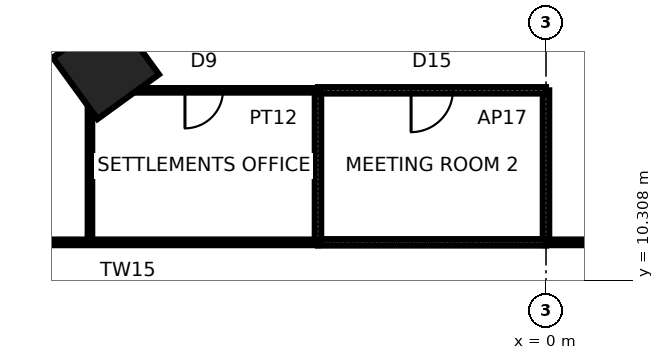
"""IFC4 building model, lengths in metres.
Left out: names, types, materials, properties, quantities, classifications, styles, units other than length and angle.
Written with IfcOpenShell. Run it as: python <this file> out.ifc"""

import sys

from ifc_helpers import new_model, si_unit, direction, frame, frame_2d, origin, origin_2d, place, context, subcontext, project, spatial, rectangle, extrude, element, fill, save


model = new_model("IFC4")
c1 = context("Model", 3, precision=1e-05, world=origin(), true_north=direction((0.0, 1.0)))
c2 = subcontext(c1, "Body", "Model", "MODEL_VIEW")
j1 = project(units=[si_unit("LENGTHUNIT", "METRE"), si_unit("PLANEANGLEUNIT", "RADIAN")], contexts=[c1])
p1 = place(None, origin())
s1 = spatial("IfcSite", under=j1, at=p1, CompositionType="ELEMENT")
p2 = place(p1, origin())
s2 = spatial("IfcBuilding", under=s1, at=p2, CompositionType="ELEMENT")
p3 = place(p2, frame((0.0, 0.0, 78.4)))
s3 = spatial("IfcBuildingStorey", under=s2, at=p3, CompositionType="ELEMENT", Elevation=78.4)
p4 = place(p3, frame((-11.581, 15.94, 0.0), z_axis=(0.0, 0.0, 1.0), x_axis=(-0.587785252292, 0.809016994375, 0.0)))
e1 = element("IfcColumn", 1, at=p4, inside=s3, PredefinedType="COLUMN", context=c2, shape_type="SweptSolid", body=[
    extrude(rectangle(XDim=2.0, YDim=2.0, at=origin_2d()), origin(), (0.0, 0.0, 1.0), 4.2),
])
p5 = place(p3, frame((9.0, 11.3, 0.0), z_axis=(0.0, 0.0, 1.0), x_axis=(-1.0, 0.0, 0.0)))
e2 = element("IfcWall", 2, at=p5, inside=s3, PredefinedType="PARTITIONING", context=c2, shape_type="SweptSolid", body=[
    extrude(rectangle(XDim=9.0, YDim=0.15, at=frame_2d((4.5, 0.0))), origin(), (0.0, 0.0, 1.0), 4.04),
])
p6 = place(p3, frame((0.0, 11.3, 0.0), z_axis=(0.0, 0.0, 1.0), x_axis=(0.0, 1.0, 0.0)))
e3 = element("IfcWall", 3, at=p6, inside=s3, PredefinedType="PARTITIONING", context=c2, shape_type="SweptSolid", body=[
    extrude(rectangle(XDim=4.0, YDim=0.17, at=frame_2d((2.0, 0.0))), origin(), (0.0, 0.0, 1.0), 2.84),
])
p7 = place(p3, frame((0.0, 15.3, 0.0), z_axis=(0.0, 0.0, 1.0), x_axis=(-1.0, 0.0, 0.0)))
e4 = element("IfcWall", 4, at=p7, inside=s3, PredefinedType="PARTITIONING", context=c2, shape_type="SweptSolid", body=[
    extrude(rectangle(XDim=6.0, YDim=0.17, at=frame_2d((3.0, 0.0))), origin(), (0.0, 0.0, 1.0), 3.586),
])
p8 = place(p7, frame((2.45, 0.0, 0.0)))
e5 = element("IfcOpeningElement", 5, at=p8, cuts=e4, PredefinedType="OPENING", context=c2, shape_type="SweptSolid", body=[
    extrude(rectangle(XDim=1.1, YDim=2.4, at=frame_2d((0.55, 1.2))), frame((0.0, 0.095, 0.0), z_axis=(0.0, -1.0, 0.0), x_axis=(1.0, 0.0, 0.0)), (0.0, 0.0, 1.0), 0.19),
])
p9 = place(p3, frame((-6.0, 11.3, 0.0), z_axis=(0.0, 0.0, 1.0), x_axis=(1.0, 0.0, 0.0)))
e6 = element("IfcWall", 6, at=p9, inside=s3, PredefinedType="PARTITIONING", context=c2, shape_type="SweptSolid", body=[
    extrude(rectangle(XDim=6.0, YDim=0.17, at=frame_2d((3.0, 0.0))), origin(), (0.0, 0.0, 1.0), 4.04),
])
p10 = place(p3, frame((-6.0, 15.3, 0.0), z_axis=(0.0, 0.0, 1.0), x_axis=(0.0, -1.0, 0.0)))
e7 = element("IfcWall", 7, at=p10, inside=s3, PredefinedType="PARTITIONING", context=c2, shape_type="SweptSolid", body=[
    extrude(rectangle(XDim=4.0, YDim=0.17, at=frame_2d((2.0, 0.0))), origin(), (0.0, 0.0, 1.0), 4.04),
])
p11 = place(p3, frame((-6.0, 15.3, 0.0), z_axis=(0.0, 0.0, 1.0), x_axis=(-1.0, 0.0, 0.0)))
e8 = element("IfcWall", 8, at=p11, inside=s3, PredefinedType="PARTITIONING", context=c2, shape_type="SweptSolid", body=[
    extrude(rectangle(XDim=6.0, YDim=0.12, at=frame_2d((3.0, 0.0))), origin(), (0.0, 0.0, 1.0), 4.04),
])
p12 = place(p11, frame((2.5, 0.0, 0.0)))
e9 = element("IfcOpeningElement", 9, at=p12, cuts=e8, PredefinedType="OPENING", context=c2, shape_type="SweptSolid", body=[
    extrude(rectangle(XDim=1.0, YDim=2.4, at=frame_2d((0.5, 1.2))), frame((0.0, 0.07, 0.0), z_axis=(0.0, -1.0, 0.0), x_axis=(1.0, 0.0, 0.0)), (0.0, 0.0, 1.0), 0.14),
])
p13 = place(p3, frame((-12.0, 15.3, 0.0), z_axis=(0.0, 0.0, 1.0), x_axis=(0.0, -1.0, 0.0)))
e10 = element("IfcWall", 10, at=p13, inside=s3, PredefinedType="PARTITIONING", context=c2, shape_type="SweptSolid", body=[
    extrude(rectangle(XDim=4.0, YDim=0.12, at=frame_2d((2.0, 0.0))), origin(), (0.0, 0.0, 1.0), 4.04),
])
p14 = place(p3, frame((-6.0, 11.3, 0.0), z_axis=(0.0, 0.0, 1.0), x_axis=(-1.0, 0.0, 0.0)))
e11 = element("IfcWall", 11, at=p14, inside=s3, PredefinedType="PARTITIONING", context=c2, shape_type="SweptSolid", body=[
    extrude(rectangle(XDim=10.0, YDim=0.15, at=frame_2d((5.0, 0.0))), origin(), (0.0, 0.0, 1.0), 4.04),
])
p15 = place(p12, origin())
e12 = element("IfcDoor", 12, at=p15, inside=s3, OperationType="SINGLE_SWING_RIGHT", PredefinedType="DOOR", context=c2, shape_type="SweptSolid", body=[
    extrude(rectangle(XDim=1.0, YDim=2.4, at=frame_2d((0.5, 1.2))), frame((0.0, 0.025, 0.0), z_axis=(0.0, -1.0, 0.0), x_axis=(1.0, 0.0, 0.0)), (0.0, 0.0, 1.0), 0.05),
])
fill(e9, e12)
p16 = place(p8, origin())
e13 = element("IfcDoor", 13, at=p16, inside=s3, OperationType="SINGLE_SWING_RIGHT", PredefinedType="DOOR", context=c2, shape_type="SweptSolid", body=[
    extrude(rectangle(XDim=1.1, YDim=2.4, at=frame_2d((0.55, 1.2))), frame((0.0, 0.025, 0.0), z_axis=(0.0, -1.0, 0.0), x_axis=(1.0, 0.0, 0.0)), (0.0, 0.0, 1.0), 0.05),
])
fill(e5, e13)
save(model, sys.argv[1])
